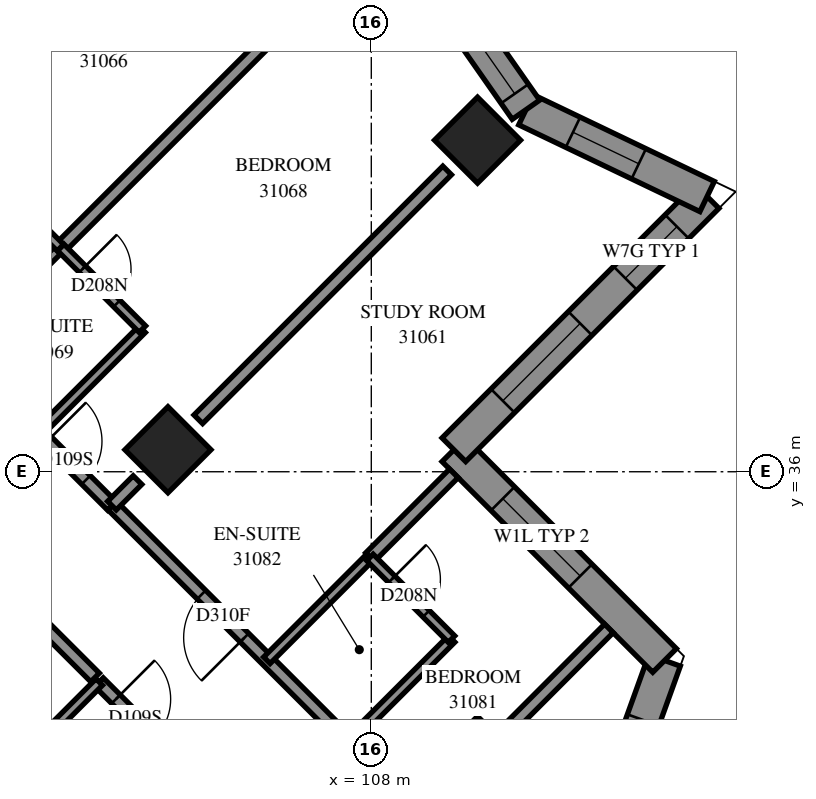
"""IFC4 building model, lengths in metres.
Left out: names, types, materials, properties, quantities, classifications, styles, units other than length and angle.
Written with IfcOpenShell. Run it as: python <this file> out.ifc"""

import sys

from ifc_helpers import new_model, si_unit, direction, frame, frame_2d, origin, origin_2d, place, context, subcontext, project, spatial, polyline, rectangle, outline, extrude, element, fill, save


model = new_model("IFC4")
c1 = context("Model", 3, precision=1e-05, world=origin(), true_north=direction((0.0, 1.0)))
c2 = subcontext(c1, "Body", "Model", "MODEL_VIEW")
j1 = project(units=[si_unit("LENGTHUNIT", "METRE"), si_unit("PLANEANGLEUNIT", "RADIAN")], contexts=[c1])
p1 = place(None, origin())
s1 = spatial("IfcSite", under=j1, at=p1, CompositionType="ELEMENT")
p2 = place(p1, origin())
s2 = spatial("IfcBuilding", under=s1, at=p2, CompositionType="ELEMENT")
p3 = place(p2, frame((0.0, 0.0, 115.2)))
s3 = spatial("IfcBuildingStorey", under=s2, at=p3, CompositionType="ELEMENT", Elevation=115.2)
for number, where, z_axis, x_axis in (
    (1, (109.747, 41.453, 0.0), (0.0, 0.0, 1.0), (0.707, -0.707, 0.0)),
    (2, (104.656, 36.362, 0.0), (0.0, 0.0, 1.0), (0.707, -0.707, 0.0)),
    (3, (109.747, 31.271, 0.0), (0.0, 0.0, 1.0), (0.707, -0.707, 0.0)),
):
    element("IfcColumn", number, at=place(p3, frame(where, z_axis=z_axis, x_axis=x_axis)), inside=s3, PredefinedType="COLUMN", context=c2, shape_type="SweptSolid", body=[
        extrude(rectangle(XDim=1.0, YDim=1.0, at=origin_2d()), origin(), (0.0, 0.0, 1.0), 3.1),
    ])
p4 = place(p3, frame((111.015, 27.874, 0.0), z_axis=(0.0, 0.0, 1.0), x_axis=(0.3387725306, 0.9408683077, 0.0)))
e4 = element("IfcWall", 4, at=p4, inside=s3, PredefinedType="SOLIDWALL", context=c2, shape_type="SweptSolid", body=[
    extrude(outline(polyline([(-0.124, -0.275), (5.513, -0.275), (5.164, 0.275), (0.124, 0.275), (-0.124, -0.275)])), origin(), (0.0, 0.0, 1.0), 3.1),
])
p5 = place(p4, frame((1.498, 0.0, 0.5)))
e5 = element("IfcOpeningElement", 5, at=p5, cuts=e4, PredefinedType="OPENING", context=c2, shape_type="SweptSolid", body=[
    extrude(rectangle(XDim=1.3, YDim=2.45, at=frame_2d((0.65, 1.225))), frame((0.0, 0.285, 0.0), z_axis=(0.0, -1.0, 0.0), x_axis=(1.0, 0.0, 0.0)), (0.0, 0.0, 1.0), 0.57),
])
p6 = place(p4, frame((2.998, 0.0, 0.5)))
e6 = element("IfcOpeningElement", 6, at=p6, cuts=e4, PredefinedType="OPENING", context=c2, shape_type="SweptSolid", body=[
    extrude(rectangle(XDim=1.3, YDim=2.45, at=frame_2d((0.65, 1.225))), frame((0.0, 0.285, 0.0), z_axis=(0.0, -1.0, 0.0), x_axis=(1.0, 0.0, 0.0)), (0.0, 0.0, 1.0), 0.57),
])
p7 = place(p3, frame((112.823, 32.897, 0.0), z_axis=(0.0, 0.0, 1.0), x_axis=(-0.7071067812, 0.7071067812, 0.0)))
e7 = element("IfcWall", 7, at=p7, inside=s3, PredefinedType="SOLIDWALL", context=c2, shape_type="SweptSolid", body=[
    extrude(outline(polyline([(-0.174, -0.275), (4.625, -0.275), (5.176, 0.275), (0.174, 0.275), (-0.174, -0.275)])), origin(), (0.0, 0.0, 1.0), 3.1),
])
p8 = place(p7, frame((1.963, 0.0, 0.6)))
e8 = element("IfcOpeningElement", 8, at=p8, cuts=e7, PredefinedType="OPENING", context=c2, shape_type="SweptSolid", body=[
    extrude(rectangle(XDim=1.8, YDim=1.9, at=frame_2d((0.9, 0.95))), frame((0.0, 0.285, 0.0), z_axis=(0.0, -1.0, 0.0), x_axis=(1.0, 0.0, 0.0)), (0.0, 0.0, 1.0), 0.57),
])
p9 = place(p3, frame((109.358, 36.362, 0.0), z_axis=(0.0, 0.0, 1.0), x_axis=(0.7071067812, 0.7071067812, 0.0)))
e9 = element("IfcWall", 9, at=p9, inside=s3, PredefinedType="SOLIDWALL", context=c2, shape_type="SweptSolid", body=[
    extrude(outline(polyline([(0.275, -0.275), (6.278, -0.275), (5.501, 0.275), (-0.275, 0.275), (0.275, -0.275)])), origin(), (0.0, 0.0, 1.0), 3.1),
])
p10 = place(p9, frame((1.137, 0.0, 0.6)))
e10 = element("IfcOpeningElement", 10, at=p10, cuts=e9, PredefinedType="OPENING", context=c2, shape_type="SweptSolid", body=[
    extrude(rectangle(XDim=1.8, YDim=1.9, at=frame_2d((0.9, 0.95))), frame((0.0, 0.285, 0.0), z_axis=(0.0, -1.0, 0.0), x_axis=(1.0, 0.0, 0.0)), (0.0, 0.0, 1.0), 0.57),
])
p11 = place(p9, frame((3.988, 0.0, 0.6)))
e11 = element("IfcOpeningElement", 11, at=p11, cuts=e9, PredefinedType="OPENING", context=c2, shape_type="SweptSolid", body=[
    extrude(rectangle(XDim=1.2, YDim=1.9, at=frame_2d((0.6, 0.95))), frame((0.0, 0.285, 0.0), z_axis=(0.0, -1.0, 0.0), x_axis=(1.0, 0.0, 0.0)), (0.0, 0.0, 1.0), 0.57),
])
p12 = place(p3, frame((113.523, 40.526, 0.0), z_axis=(0.0, 0.0, 1.0), x_axis=(-0.9019138195, 0.431916036, 0.0)))
e12 = element("IfcWall", 12, at=p12, inside=s3, PredefinedType="SOLIDWALL", context=c2, shape_type="SweptSolid", body=[
    extrude(outline(polyline([(-0.389, -0.275), (3.231, -0.275), (3.376, 0.275), (0.389, 0.275), (-0.389, -0.275)])), origin(), (0.0, 0.0, 1.0), 3.1),
])
p13 = place(p12, frame((1.246, 0.0, 0.5)))
e13 = element("IfcOpeningElement", 13, at=p13, cuts=e12, PredefinedType="OPENING", context=c2, shape_type="SweptSolid", body=[
    extrude(rectangle(XDim=1.2, YDim=2.45, at=frame_2d((0.6, 1.225))), frame((0.0, 0.285, 0.0), z_axis=(0.0, -1.0, 0.0), x_axis=(1.0, 0.0, 0.0)), (0.0, 0.0, 1.0), 0.57),
])
p14 = place(p3, frame((110.543, 41.953, 0.0), z_axis=(0.0, 0.0, 1.0), x_axis=(-0.5733354333, 0.8193207436, 0.0)))
e14 = element("IfcWall", 14, at=p14, inside=s3, PredefinedType="SOLIDWALL", context=c2, shape_type="SweptSolid", body=[
    extrude(outline(polyline([(0.072, -0.275), (3.539, -0.275), (3.442, 0.275), (-0.072, 0.275), (0.072, -0.275)])), origin(), (0.0, 0.0, 1.0), 3.1),
])
p15 = place(p14, frame((0.321, 0.0, 0.5)))
e15 = element("IfcOpeningElement", 15, at=p15, cuts=e14, PredefinedType="OPENING", context=c2, shape_type="SweptSolid", body=[
    extrude(rectangle(XDim=1.3, YDim=2.45, at=frame_2d((0.65, 1.225))), frame((0.0, 0.285, 0.0), z_axis=(0.0, -1.0, 0.0), x_axis=(1.0, 0.0, 0.0)), (0.0, 0.0, 1.0), 0.57),
])
p16 = place(p14, frame((1.821, 0.0, 0.5)))
e16 = element("IfcOpeningElement", 16, at=p16, cuts=e14, PredefinedType="OPENING", context=c2, shape_type="SweptSolid", body=[
    extrude(rectangle(XDim=1.3, YDim=2.45, at=frame_2d((0.65, 1.225))), frame((0.0, 0.285, 0.0), z_axis=(0.0, -1.0, 0.0), x_axis=(1.0, 0.0, 0.0)), (0.0, 0.0, 1.0), 0.57),
])
p17 = place(p3, frame((102.888, 39.686, 0.0), z_axis=(0.0, 0.0, 1.0), x_axis=(0.7071067812, 0.7071067812, 0.0)))
e17 = element("IfcWall", 17, at=p17, inside=s3, PredefinedType="PARTITIONING", context=c2, shape_type="SweptSolid", body=[
    extrude(rectangle(XDim=7.278, YDim=0.2, at=frame_2d((3.639, 0.0))), origin(), (0.0, 0.0, 1.0), 3.1),
])
p18 = place(p3, frame((108.831, 30.355, 0.0), z_axis=(0.0, 0.0, 1.0), x_axis=(-0.7073012053, 0.7069123036, 0.0)))
e18 = element("IfcWall", 18, at=p18, inside=s3, PredefinedType="PARTITIONING", context=c2, shape_type="SweptSolid", body=[
    extrude(rectangle(XDim=7.2, YDim=0.2, at=frame_2d((3.6, 0.0))), origin(), (0.0, 0.0, 1.0), 2.6),
])
p19 = place(p18, frame((4.125, 0.0, 0.0)))
e19 = element("IfcOpeningElement", 19, at=p19, cuts=e18, PredefinedType="OPENING", context=c2, shape_type="SweptSolid", body=[
    extrude(rectangle(XDim=1.0, YDim=2.1, at=frame_2d((0.5, 1.05))), frame((0.0, 0.11, 0.0), z_axis=(0.0, -1.0, 0.0), x_axis=(1.0, 0.0, 0.0)), (0.0, 0.0, 1.0), 0.22),
])
p20 = place(p18, frame((0.705, 0.0, 0.0)))
e20 = element("IfcOpeningElement", 20, at=p20, cuts=e18, PredefinedType="OPENING", context=c2, shape_type="SweptSolid", body=[
    extrude(rectangle(XDim=0.9, YDim=2.1, at=frame_2d((0.45, 1.05))), frame((0.0, 0.11, 0.0), z_axis=(0.0, -1.0, 0.0), x_axis=(1.0, 0.0, 0.0)), (0.0, 0.0, 1.0), 0.22),
])
for number, where, z_axis, x_axis in (
    (21, (105.155, 36.863, 0.0), (0.0, 0.0, 1.0), (0.707, 0.707, 0.0)),
    (22, (100.063, 41.953, 0.0), (0.0, 0.0, 1.0), (0.707, 0.707, 0.0)),
):
    element("IfcWall", number, at=place(p3, frame(where, z_axis=z_axis, x_axis=x_axis)), inside=s3, PredefinedType="PARTITIONING", context=c2, shape_type="SweptSolid", body=[
        extrude(rectangle(XDim=5.787, YDim=0.2, at=frame_2d((2.893, 0.0))), origin(), (0.0, 0.0, 1.0), 3.1),
    ])
p21 = place(p3, frame((103.521, 32.541, 0.0), z_axis=(0.0, 0.0, 1.0), x_axis=(0.7071067812, -0.7071067812, 0.0)))
e23 = element("IfcWall", 23, at=p21, inside=s3, PredefinedType="PARTITIONING", context=c2, shape_type="SweptSolid", body=[
    extrude(rectangle(XDim=5.301, YDim=0.2, at=frame_2d((2.65, 0.0))), origin(), (0.0, 0.0, 1.0), 3.1),
])
p22 = place(p21, frame((0.396, 0.0, 0.0)))
e24 = element("IfcOpeningElement", 24, at=p22, cuts=e23, PredefinedType="OPENING", context=c2, shape_type="SweptSolid", body=[
    extrude(rectangle(XDim=0.9, YDim=2.1, at=frame_2d((0.45, 1.05))), frame((0.0, 0.11, 0.0), z_axis=(0.0, -1.0, 0.0), x_axis=(1.0, 0.0, 0.0)), (0.0, 0.0, 1.0), 0.22),
])
p23 = place(p3, frame((102.533, 36.645, 0.0), z_axis=(0.0, 0.0, 1.0), x_axis=(0.7071067812, 0.7071067812, 0.0)))
e25 = element("IfcWall", 25, at=p23, inside=s3, PredefinedType="PARTITIONING", context=c2, shape_type="SweptSolid", body=[
    extrude(rectangle(XDim=2.401, YDim=0.15, at=frame_2d((1.201, 0.0))), origin(), (0.0, 0.0, 1.0), 3.1),
])
for number, where, z_axis, x_axis in (
    (26, (101.192, 37.988, 0.0), (0.0, 0.0, 1.0), (0.707, 0.708, 0.0)),
    (27, (101.83, 30.844, 0.0), (0.0, 0.0, 1.0), (0.707, 0.708, 0.0)),
):
    element("IfcWall", number, at=place(p3, frame(where, z_axis=z_axis, x_axis=x_axis)), inside=s3, PredefinedType="PARTITIONING", context=c2, shape_type="SweptSolid", body=[
        extrude(rectangle(XDim=2.4, YDim=0.15, at=frame_2d((1.2, 0.0))), origin(), (0.0, 0.0, 1.0), 3.1),
    ])
p24 = place(p3, frame((106.283, 32.899, 0.0), z_axis=(0.0, 0.0, 1.0), x_axis=(0.7071067812, 0.7071067812, 0.0)))
e28 = element("IfcWall", 28, at=p24, inside=s3, PredefinedType="PARTITIONING", context=c2, shape_type="SweptSolid", body=[
    extrude(rectangle(XDim=2.398, YDim=0.15, at=frame_2d((1.199, 0.0))), origin(), (0.0, 0.0, 1.0), 3.1),
])
p25 = place(p3, frame((107.625, 31.555, 0.0), z_axis=(0.0, 0.0, 1.0), x_axis=(0.7071067812, 0.7071067812, 0.0)))
e29 = element("IfcWall", 29, at=p25, inside=s3, PredefinedType="PARTITIONING", context=c2, shape_type="SweptSolid", body=[
    extrude(rectangle(XDim=2.398, YDim=0.15, at=frame_2d((1.199, 0.0))), origin(), (0.0, 0.0, 1.0), 2.6),
])
p26 = place(p3, frame((110.251, 31.767, 0.0), z_axis=(0.0, 0.0, 1.0), x_axis=(0.7066584143, 0.7075548639, 0.0)))
e30 = element("IfcWall", 30, at=p26, inside=s3, PredefinedType="PARTITIONING", context=c2, shape_type="SweptSolid", body=[
    extrude(rectangle(XDim=2.343, YDim=0.2, at=frame_2d((1.171, 0.0))), origin(), (0.0, 0.0, 1.0), 3.1),
])
p27 = place(p3, frame((102.891, 39.69, 0.0), z_axis=(0.0, 0.0, 1.0), x_axis=(0.7071067812, -0.7071067812, 0.0)))
e31 = element("IfcWall", 31, at=p27, inside=s3, PredefinedType="PARTITIONING", context=c2, shape_type="SweptSolid", body=[
    extrude(rectangle(XDim=1.901, YDim=0.15, at=frame_2d((0.95, 0.0))), origin(), (0.0, 0.0, 1.0), 3.1),
])
p28 = place(p27, frame((0.505, 0.0, 0.0)))
e32 = element("IfcOpeningElement", 32, at=p28, cuts=e31, PredefinedType="OPENING", context=c2, shape_type="SweptSolid", body=[
    extrude(rectangle(XDim=0.8, YDim=2.1, at=frame_2d((0.4, 1.05))), frame((0.0, 0.085, 0.0), z_axis=(0.0, -1.0, 0.0), x_axis=(1.0, 0.0, 0.0)), (0.0, 0.0, 1.0), 0.17),
])
p29 = place(p3, frame((107.979, 34.595, 0.0), z_axis=(0.0, 0.0, 1.0), x_axis=(0.7071067812, 0.7071067812, 0.0)))
e33 = element("IfcWall", 33, at=p29, inside=s3, PredefinedType="PARTITIONING", context=c2, shape_type="SweptSolid", body=[
    extrude(rectangle(XDim=1.95, YDim=0.2, at=frame_2d((0.975, 0.0))), origin(), (0.0, 0.0, 1.0), 3.1),
])
p30 = place(p3, frame((107.977, 34.591, 0.0), z_axis=(0.0, 0.0, 1.0), x_axis=(0.7065800724, -0.7076330979, 0.0)))
e34 = element("IfcWall", 34, at=p30, inside=s3, PredefinedType="PARTITIONING", context=c2, shape_type="SweptSolid", body=[
    extrude(rectangle(XDim=1.899, YDim=0.15, at=frame_2d((0.95, 0.0))), origin(), (0.0, 0.0, 1.0), 3.1),
])
p31 = place(p30, frame((0.508, 0.0, 0.0)))
e35 = element("IfcOpeningElement", 35, at=p31, cuts=e34, PredefinedType="OPENING", context=c2, shape_type="SweptSolid", body=[
    extrude(rectangle(XDim=0.8, YDim=2.1, at=frame_2d((0.4, 1.05))), frame((0.0, 0.085, 0.0), z_axis=(0.0, -1.0, 0.0), x_axis=(1.0, 0.0, 0.0)), (0.0, 0.0, 1.0), 0.17),
])
p32 = place(p3, frame((101.543, 41.027, 0.0), z_axis=(0.0, 0.0, 1.0), x_axis=(0.7076330979, -0.7065800724, 0.0)))
e36 = element("IfcWall", 36, at=p32, inside=s3, PredefinedType="PARTITIONING", context=c2, shape_type="SweptSolid", body=[
    extrude(rectangle(XDim=1.899, YDim=0.15, at=frame_2d((0.95, 0.0))), origin(), (0.0, 0.0, 1.0), 3.1),
])
p33 = place(p32, frame((0.493, 0.0, 0.0)))
e37 = element("IfcOpeningElement", 37, at=p33, cuts=e36, PredefinedType="OPENING", context=c2, shape_type="SweptSolid", body=[
    extrude(rectangle(XDim=0.8, YDim=2.1, at=frame_2d((0.4, 1.05))), frame((0.0, 0.085, 0.0), z_axis=(0.0, -1.0, 0.0), x_axis=(1.0, 0.0, 0.0)), (0.0, 0.0, 1.0), 0.17),
])
p34 = place(p3, frame((102.183, 33.889, 0.0), z_axis=(0.0, 0.0, 1.0), x_axis=(0.7076620277, -0.7065510983, 0.0)))
e38 = element("IfcWall", 38, at=p34, inside=s3, PredefinedType="PARTITIONING", context=c2, shape_type="SweptSolid", body=[
    extrude(rectangle(XDim=1.8, YDim=0.2, at=frame_2d((0.9, 0.0))), origin(), (0.0, 0.0, 1.0), 3.1),
])
p35 = place(p3, frame((102.531, 36.641, 0.0), z_axis=(0.0, 0.0, 1.0), x_axis=(0.7071067812, -0.7071067812, 0.0)))
e39 = element("IfcWall", 39, at=p35, inside=s3, PredefinedType="PARTITIONING", context=c2, shape_type="SweptSolid", body=[
    extrude(rectangle(XDim=1.7, YDim=0.2, at=frame_2d((0.85, 0.0))), origin(), (0.0, 0.0, 1.0), 3.1),
])
p36 = place(p35, frame((0.198, 0.0, 0.0)))
e40 = element("IfcOpeningElement", 40, at=p36, cuts=e39, PredefinedType="OPENING", context=c2, shape_type="SweptSolid", body=[
    extrude(rectangle(XDim=0.9, YDim=2.1, at=frame_2d((0.45, 1.05))), frame((0.0, 0.11, 0.0), z_axis=(0.0, -1.0, 0.0), x_axis=(1.0, 0.0, 0.0)), (0.0, 0.0, 1.0), 0.22),
])
p37 = place(p3, frame((103.735, 35.443, 0.0), z_axis=(0.0, 0.0, 1.0), x_axis=(0.7071067812, 0.7071067812, 0.0)))
e41 = element("IfcWall", 41, at=p37, inside=s3, PredefinedType="PARTITIONING", context=c2, shape_type="SweptSolid", body=[
    extrude(rectangle(XDim=0.594, YDim=0.2, at=frame_2d((0.297, 0.0))), origin(), (0.0, 0.0, 1.0), 3.1),
])
p38 = place(p6, origin())
e42 = element("IfcWindow", 42, at=p38, inside=s3, PartitioningType="SINGLE_PANEL", PredefinedType="WINDOW", context=c2, shape_type="SweptSolid", body=[
    extrude(rectangle(XDim=1.3, YDim=2.45, at=frame_2d((0.65, 1.225))), frame((0.0, 0.155, 0.0), z_axis=(0.0, -1.0, 0.0), x_axis=(1.0, 0.0, 0.0)), (0.0, 0.0, 1.0), 0.06),
])
fill(e6, e42)
p39 = place(p8, origin())
e43 = element("IfcWindow", 43, at=p39, inside=s3, PartitioningType="SINGLE_PANEL", PredefinedType="WINDOW", context=c2, shape_type="SweptSolid", body=[
    extrude(rectangle(XDim=1.8, YDim=1.9, at=frame_2d((0.9, 0.95))), frame((0.0, 0.155, 0.0), z_axis=(0.0, -1.0, 0.0), x_axis=(1.0, 0.0, 0.0)), (0.0, 0.0, 1.0), 0.06),
])
fill(e8, e43)
p40 = place(p10, origin())
e44 = element("IfcWindow", 44, at=p40, inside=s3, PartitioningType="SINGLE_PANEL", PredefinedType="WINDOW", context=c2, shape_type="SweptSolid", body=[
    extrude(rectangle(XDim=1.8, YDim=1.9, at=frame_2d((0.9, 0.95))), frame((0.0, 0.155, 0.0), z_axis=(0.0, -1.0, 0.0), x_axis=(1.0, 0.0, 0.0)), (0.0, 0.0, 1.0), 0.06),
])
fill(e10, e44)
p41 = place(p11, origin())
e45 = element("IfcWindow", 45, at=p41, inside=s3, PartitioningType="SINGLE_PANEL", PredefinedType="WINDOW", context=c2, shape_type="SweptSolid", body=[
    extrude(rectangle(XDim=1.2, YDim=1.9, at=frame_2d((0.6, 0.95))), frame((0.0, 0.155, 0.0), z_axis=(0.0, -1.0, 0.0), x_axis=(1.0, 0.0, 0.0)), (0.0, 0.0, 1.0), 0.06),
])
fill(e11, e45)
p42 = place(p13, origin())
e46 = element("IfcWindow", 46, at=p42, inside=s3, PartitioningType="SINGLE_PANEL", PredefinedType="WINDOW", context=c2, shape_type="SweptSolid", body=[
    extrude(rectangle(XDim=1.2, YDim=2.45, at=frame_2d((0.6, 1.225))), frame((0.0, 0.155, 0.0), z_axis=(0.0, -1.0, 0.0), x_axis=(1.0, 0.0, 0.0)), (0.0, 0.0, 1.0), 0.06),
])
fill(e13, e46)
p43 = place(p15, origin())
e47 = element("IfcWindow", 47, at=p43, inside=s3, PartitioningType="SINGLE_PANEL", PredefinedType="WINDOW", context=c2, shape_type="SweptSolid", body=[
    extrude(rectangle(XDim=1.3, YDim=2.45, at=frame_2d((0.65, 1.225))), frame((0.0, 0.155, 0.0), z_axis=(0.0, -1.0, 0.0), x_axis=(1.0, 0.0, 0.0)), (0.0, 0.0, 1.0), 0.06),
])
fill(e15, e47)
p44 = place(p19, origin())
e48 = element("IfcDoor", 48, at=p44, inside=s3, OperationType="SINGLE_SWING_LEFT", PredefinedType="DOOR", context=c2, shape_type="SweptSolid", body=[
    extrude(rectangle(XDim=1.0, YDim=2.1, at=frame_2d((0.5, 1.05))), frame((0.0, 0.025, 0.0), z_axis=(0.0, -1.0, 0.0), x_axis=(1.0, 0.0, 0.0)), (0.0, 0.0, 1.0), 0.05),
])
fill(e19, e48)
p45 = place(p36, origin())
e49 = element("IfcDoor", 49, at=p45, inside=s3, OperationType="SINGLE_SWING_RIGHT", PredefinedType="DOOR", context=c2, shape_type="SweptSolid", body=[
    extrude(rectangle(XDim=0.9, YDim=2.1, at=frame_2d((0.45, 1.05))), frame((0.0, 0.025, 0.0), z_axis=(0.0, -1.0, 0.0), x_axis=(1.0, 0.0, 0.0)), (0.0, 0.0, 1.0), 0.05),
])
fill(e40, e49)
p46 = place(p28, origin())
e50 = element("IfcDoor", 50, at=p46, inside=s3, OperationType="SINGLE_SWING_RIGHT", PredefinedType="DOOR", context=c2, shape_type="SweptSolid", body=[
    extrude(rectangle(XDim=0.8, YDim=2.1, at=frame_2d((0.4, 1.05))), frame((0.0, 0.025, 0.0), z_axis=(0.0, -1.0, 0.0), x_axis=(1.0, 0.0, 0.0)), (0.0, 0.0, 1.0), 0.05),
])
fill(e32, e50)
p47 = place(p22, origin())
e51 = element("IfcDoor", 51, at=p47, inside=s3, OperationType="SINGLE_SWING_RIGHT", PredefinedType="DOOR", context=c2, shape_type="SweptSolid", body=[
    extrude(rectangle(XDim=0.9, YDim=2.1, at=frame_2d((0.45, 1.05))), frame((0.0, 0.025, 0.0), z_axis=(0.0, -1.0, 0.0), x_axis=(1.0, 0.0, 0.0)), (0.0, 0.0, 1.0), 0.05),
])
fill(e24, e51)
p48 = place(p31, origin())
e52 = element("IfcDoor", 52, at=p48, inside=s3, OperationType="SINGLE_SWING_RIGHT", PredefinedType="DOOR", context=c2, shape_type="SweptSolid", body=[
    extrude(rectangle(XDim=0.8, YDim=2.1, at=frame_2d((0.4, 1.05))), frame((0.0, 0.025, 0.0), z_axis=(0.0, -1.0, 0.0), x_axis=(1.0, 0.0, 0.0)), (0.0, 0.0, 1.0), 0.05),
])
fill(e35, e52)
save(model, sys.argv[1])
